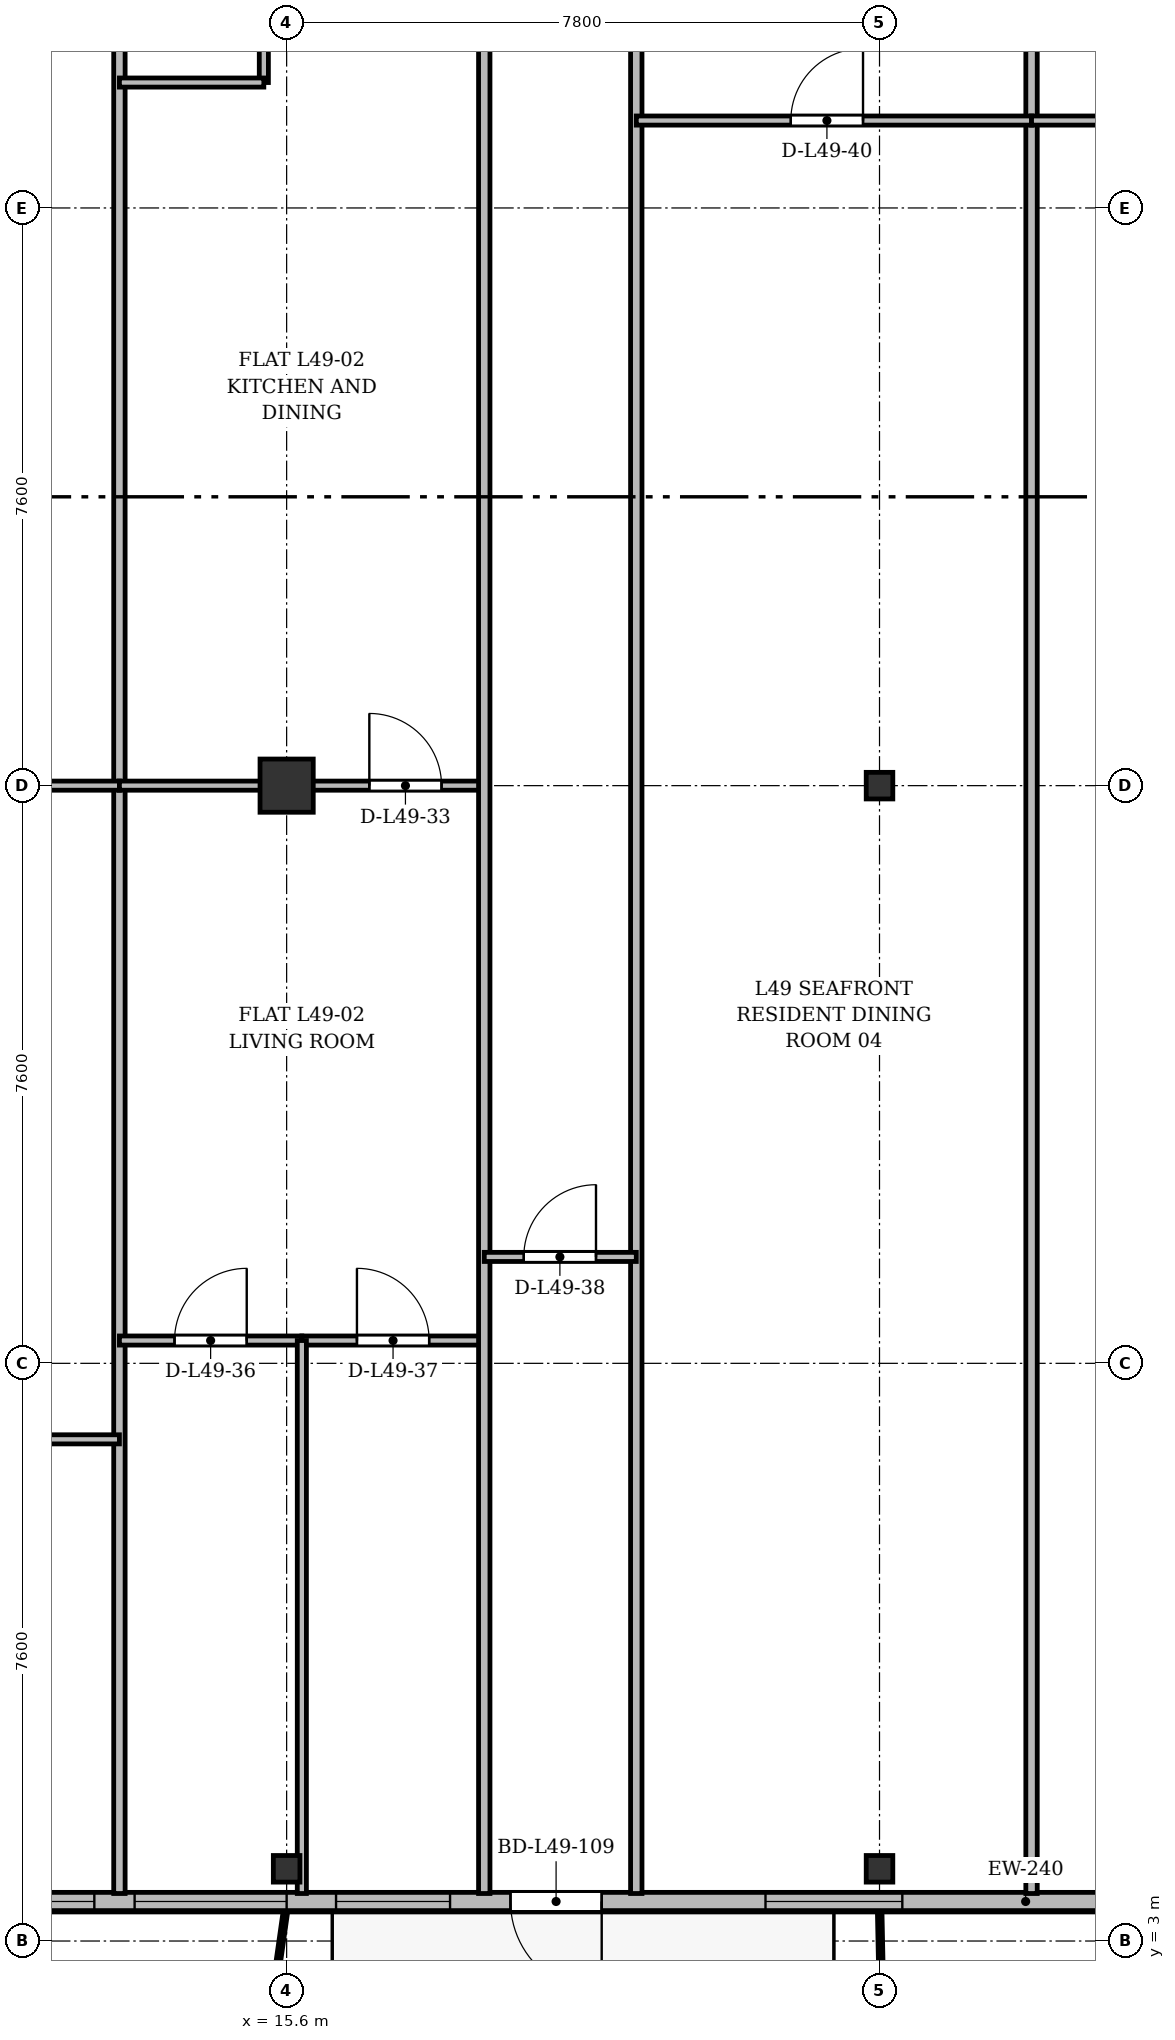
"""IFC4 building model, lengths in metres.
Left out: names, types, materials, properties, quantities, classifications, styles, units other than length and angle.
Written with IfcOpenShell. Run it as: python <this file> out.ifc"""

import sys

from ifc_helpers import new_model, si_unit, direction, frame, frame_2d, origin, origin_2d, place, context, subcontext, project, spatial, rectangle, i_section, extrude, source, transform, mapped, element, fill, save


model = new_model("IFC4")
c1 = context("Model", 3, precision=1e-05, world=origin(), true_north=direction((0.0, 1.0)))
c2 = subcontext(c1, "Body", "Model", "MODEL_VIEW")
j1 = project(units=[si_unit("LENGTHUNIT", "METRE"), si_unit("PLANEANGLEUNIT", "RADIAN")], contexts=[c1])
p1 = place(None, origin())
s1 = spatial("IfcSite", under=j1, at=p1, CompositionType="ELEMENT")
p2 = place(p1, origin())
s2 = spatial("IfcBuilding", under=s1, at=p2, CompositionType="ELEMENT")
p3 = place(p2, frame((0.0, 0.0, 190.5)))
s3 = spatial("IfcBuildingStorey", under=s2, at=p3, CompositionType="ELEMENT", Elevation=190.5)
m1 = source(origin(), c2, "Body", "SweptSolid", [
    extrude(i_section(OverallWidth=0.35, OverallDepth=0.35, WebThickness=0.018, FlangeThickness=0.028, at=origin_2d()), origin(), (0.0, 0.0, 1.0), 3.6),
])
p4 = place(p3, frame((15.6, 3.95, 0.0), z_axis=(0.0, 0.0, 1.0), x_axis=(1.0, 0.0, 0.0)))
e1 = element("IfcColumn", 1, at=p4, inside=s3, PredefinedType="COLUMN", context=c2, shape_type="MappedRepresentation", body=[
    mapped(m1, transform((0.0, 0.0, 0.0), x_axis=(1.0, 0.0, 0.0), y_axis=(0.0, 1.0, 0.0), z_axis=(0.0, 0.0, 1.0), scale=1.0)),
])
m2 = source(origin(), c2, "Body", "SweptSolid", [
    extrude(rectangle(XDim=0.7, YDim=0.7, at=origin_2d()), origin(), (0.0, 0.0, 1.0), 3.6),
])
p5 = place(p3, frame((15.6, 18.2, 0.0), z_axis=(0.0, 0.0, 1.0), x_axis=(1.0, 0.0, 0.0)))
e2 = element("IfcColumn", 2, at=p5, inside=s3, PredefinedType="COLUMN", context=c2, shape_type="MappedRepresentation", body=[
    mapped(m2, transform((0.0, 0.0, 0.0), x_axis=(1.0, 0.0, 0.0), y_axis=(0.0, 1.0, 0.0), z_axis=(0.0, 0.0, 1.0), scale=1.0)),
])
for number, where, z_axis, x_axis in (
    (3, (23.4, 3.95, 0.0), (0.0, 0.0, 1.0), (1.0, 0.0, 0.0)),
    (4, (23.4, 18.2, 0.0), (0.0, 0.0, 1.0), (1.0, 0.0, 0.0)),
):
    element("IfcColumn", number, at=place(p3, frame(where, z_axis=z_axis, x_axis=x_axis)), inside=s3, PredefinedType="COLUMN", context=c2, shape_type="MappedRepresentation", body=[
        mapped(m1, transform((0.0, 0.0, 0.0), x_axis=(1.0, 0.0, 0.0), y_axis=(0.0, 1.0, 0.0), z_axis=(0.0, 0.0, 1.0), scale=1.0)),
    ])
p6 = place(p3, frame((30.6, 3.52, 0.0), z_axis=(0.0, 0.0, 1.0), x_axis=(-1.0, 0.0, 0.0)))
e5 = element("IfcWall", 5, at=p6, inside=s3, PredefinedType="SOLIDWALL", context=c2, shape_type="SweptSolid", body=[
    extrude(rectangle(XDim=19.6, YDim=0.24, at=frame_2d((9.8, 0.0))), origin(), (0.0, 0.0, 1.0), 3.36),
])
p7 = place(p6, frame((1.82, 0.0, 0.9)))
e6 = element("IfcOpeningElement", 6, at=p7, cuts=e5, PredefinedType="OPENING", context=c2, shape_type="SweptSolid", body=[
    extrude(rectangle(XDim=1.65, YDim=1.85, at=frame_2d((0.825, 0.925))), frame((0.0, 0.13, 0.0), z_axis=(0.0, -1.0, 0.0), x_axis=(1.0, 0.0, 0.0)), (0.0, 0.0, 1.0), 0.26),
])
p8 = place(p6, frame((6.9, 0.0, 0.9)))
e7 = element("IfcOpeningElement", 7, at=p8, cuts=e5, PredefinedType="OPENING", context=c2, shape_type="SweptSolid", body=[
    extrude(rectangle(XDim=1.8, YDim=1.8, at=frame_2d((0.9, 0.9))), frame((0.0, 0.13, 0.0), z_axis=(0.0, -1.0, 0.0), x_axis=(1.0, 0.0, 0.0)), (0.0, 0.0, 1.0), 0.26),
])
p9 = place(p6, frame((10.855, 0.0, 0.0)))
e8 = element("IfcOpeningElement", 8, at=p9, cuts=e5, PredefinedType="OPENING", context=c2, shape_type="SweptSolid", body=[
    extrude(rectangle(XDim=1.2, YDim=2.2, at=frame_2d((0.6, 1.1))), frame((0.0, 0.13, 0.0), z_axis=(0.0, -1.0, 0.0), x_axis=(1.0, 0.0, 0.0)), (0.0, 0.0, 1.0), 0.26),
])
p10 = place(p6, frame((12.85, 0.0, 0.9)))
e9 = element("IfcOpeningElement", 9, at=p10, cuts=e5, PredefinedType="OPENING", context=c2, shape_type="SweptSolid", body=[
    extrude(rectangle(XDim=1.5, YDim=1.75, at=frame_2d((0.75, 0.875))), frame((0.0, 0.13, 0.0), z_axis=(0.0, -1.0, 0.0), x_axis=(1.0, 0.0, 0.0)), (0.0, 0.0, 1.0), 0.26),
])
p11 = place(p6, frame((15.0, 0.0, 0.9)))
e10 = element("IfcOpeningElement", 10, at=p11, cuts=e5, PredefinedType="OPENING", context=c2, shape_type="SweptSolid", body=[
    extrude(rectangle(XDim=2.0, YDim=1.95, at=frame_2d((1.0, 0.975))), frame((0.0, 0.13, 0.0), z_axis=(0.0, -1.0, 0.0), x_axis=(1.0, 0.0, 0.0)), (0.0, 0.0, 1.0), 0.26),
])
p12 = place(p6, frame((17.53, 0.0, 0.9)))
e11 = element("IfcOpeningElement", 11, at=p12, cuts=e5, PredefinedType="OPENING", context=c2, shape_type="SweptSolid", body=[
    extrude(rectangle(XDim=1.65, YDim=1.85, at=frame_2d((0.825, 0.925))), frame((0.0, 0.13, 0.0), z_axis=(0.0, -1.0, 0.0), x_axis=(1.0, 0.0, 0.0)), (0.0, 0.0, 1.0), 0.26),
])
for number, where, z_axis, x_axis in (
    (12, (13.4, 3.625, 0.0), (0.0, 0.0, 1.0), (0.0, 1.0, 0.0)),
    (13, (25.4, 3.625, 0.0), (0.0, 0.0, 1.0), (0.0, 1.0, 0.0)),
):
    element("IfcWall", number, at=place(p3, frame(where, z_axis=z_axis, x_axis=x_axis)), inside=s3, PredefinedType="PARTITIONING", context=c2, shape_type="SweptSolid", body=[
        extrude(rectangle(XDim=27.175, YDim=0.15, at=frame_2d((13.587, 0.0))), origin(), (0.0, 0.0, 1.0), 2.91),
    ])
p13 = place(p3, frame((8.24, 18.2, 0.0), z_axis=(0.0, 0.0, 1.0), x_axis=(1.0, 0.0, 0.0)))
e14 = element("IfcWall", 14, at=p13, inside=s3, PredefinedType="PARTITIONING", context=c2, shape_type="SweptSolid", body=[
    extrude(rectangle(XDim=5.16, YDim=0.12, at=frame_2d((2.58, 0.0))), origin(), (0.0, 0.0, 1.0), 2.91),
])
p14 = place(p13, frame((2.014, 0.0, 0.0)))
e15 = element("IfcOpeningElement", 15, at=p14, cuts=e14, PredefinedType="OPENING", context=c2, shape_type="SweptSolid", body=[
    extrude(rectangle(XDim=0.95, YDim=2.15, at=frame_2d((0.475, 1.075))), frame((0.0, 0.07, 0.0), z_axis=(0.0, -1.0, 0.0), x_axis=(1.0, 0.0, 0.0)), (0.0, 0.0, 1.0), 0.14),
])
p15 = place(p3, frame((8.24, 9.6, 0.0), z_axis=(0.0, 0.0, 1.0), x_axis=(1.0, 0.0, 0.0)))
e16 = element("IfcWall", 16, at=p15, inside=s3, PredefinedType="PARTITIONING", context=c2, shape_type="SweptSolid", body=[
    extrude(rectangle(XDim=5.16, YDim=0.12, at=frame_2d((2.58, 0.0))), origin(), (0.0, 0.0, 1.0), 2.86),
])
p16 = place(p15, frame((2.014, 0.0, 0.0)))
e17 = element("IfcOpeningElement", 17, at=p16, cuts=e16, PredefinedType="OPENING", context=c2, shape_type="SweptSolid", body=[
    extrude(rectangle(XDim=0.95, YDim=2.15, at=frame_2d((0.475, 1.075))), frame((0.0, 0.07, 0.0), z_axis=(0.0, -1.0, 0.0), x_axis=(1.0, 0.0, 0.0)), (0.0, 0.0, 1.0), 0.14),
])
p17 = place(p3, frame((13.4, 18.2, 0.0), z_axis=(0.0, 0.0, 1.0), x_axis=(1.0, 0.0, 0.0)))
e18 = element("IfcWall", 18, at=p17, inside=s3, PredefinedType="PARTITIONING", context=c2, shape_type="SweptSolid", body=[
    extrude(rectangle(XDim=4.8, YDim=0.12, at=frame_2d((2.4, 0.0))), origin(), (0.0, 0.0, 1.0), 2.91),
])
p18 = place(p17, frame((3.288, 0.0, 0.0)))
e19 = element("IfcOpeningElement", 19, at=p18, cuts=e18, PredefinedType="OPENING", context=c2, shape_type="SweptSolid", body=[
    extrude(rectangle(XDim=0.95, YDim=2.15, at=frame_2d((0.475, 1.075))), frame((0.0, 0.07, 0.0), z_axis=(0.0, -1.0, 0.0), x_axis=(1.0, 0.0, 0.0)), (0.0, 0.0, 1.0), 0.14),
])
p19 = place(p3, frame((15.3, 27.45, 0.0), z_axis=(0.0, 0.0, 1.0), x_axis=(0.0, 1.0, 0.0)))
e20 = element("IfcWall", 20, at=p19, inside=s3, PredefinedType="PARTITIONING", context=c2, shape_type="SweptSolid", body=[
    extrude(rectangle(XDim=3.35, YDim=0.12, at=frame_2d((1.675, 0.0))), origin(), (0.0, 0.0, 1.0), 3.36),
])
p20 = place(p19, frame((0.8, 0.0, 0.0)))
e21 = element("IfcOpeningElement", 21, at=p20, cuts=e20, PredefinedType="OPENING", context=c2, shape_type="SweptSolid", body=[
    extrude(rectangle(XDim=0.85, YDim=2.1, at=frame_2d((0.425, 1.05))), frame((0.0, 0.07, 0.0), z_axis=(0.0, -1.0, 0.0), x_axis=(1.0, 0.0, 0.0)), (0.0, 0.0, 1.0), 0.14),
])
p21 = place(p3, frame((13.4, 27.45, 0.0), z_axis=(0.0, 0.0, 1.0), x_axis=(1.0, 0.0, 0.0)))
e22 = element("IfcWall", 22, at=p21, inside=s3, PredefinedType="PARTITIONING", context=c2, shape_type="SweptSolid", body=[
    extrude(rectangle(XDim=1.9, YDim=0.12, at=frame_2d((0.95, 0.0))), origin(), (0.0, 0.0, 1.0), 3.36),
])
p22 = place(p3, frame((13.4, 10.9, 0.0), z_axis=(0.0, 0.0, 1.0), x_axis=(1.0, 0.0, 0.0)))
e23 = element("IfcWall", 23, at=p22, inside=s3, PredefinedType="PARTITIONING", context=c2, shape_type="SweptSolid", body=[
    extrude(rectangle(XDim=2.4, YDim=0.12, at=frame_2d((1.2, 0.0))), origin(), (0.0, 0.0, 1.0), 2.86),
])
p23 = place(p22, frame((0.725, 0.0, 0.0)))
e24 = element("IfcOpeningElement", 24, at=p23, cuts=e23, PredefinedType="OPENING", context=c2, shape_type="SweptSolid", body=[
    extrude(rectangle(XDim=0.95, YDim=2.15, at=frame_2d((0.475, 1.075))), frame((0.0, 0.07, 0.0), z_axis=(0.0, -1.0, 0.0), x_axis=(1.0, 0.0, 0.0)), (0.0, 0.0, 1.0), 0.14),
])
p24 = place(p3, frame((15.8, 10.9, 0.0), z_axis=(0.0, 0.0, 1.0), x_axis=(1.0, 0.0, 0.0)))
e25 = element("IfcWall", 25, at=p24, inside=s3, PredefinedType="PARTITIONING", context=c2, shape_type="SweptSolid", body=[
    extrude(rectangle(XDim=2.4, YDim=0.12, at=frame_2d((1.2, 0.0))), origin(), (0.0, 0.0, 1.0), 3.36),
])
p25 = place(p24, frame((0.725, 0.0, 0.0)))
e26 = element("IfcOpeningElement", 26, at=p25, cuts=e25, PredefinedType="OPENING", context=c2, shape_type="SweptSolid", body=[
    extrude(rectangle(XDim=0.95, YDim=2.15, at=frame_2d((0.475, 1.075))), frame((0.0, 0.07, 0.0), z_axis=(0.0, -1.0, 0.0), x_axis=(1.0, 0.0, 0.0)), (0.0, 0.0, 1.0), 0.14),
])
p26 = place(p3, frame((15.8, 3.625, 0.0), z_axis=(0.0, 0.0, 1.0), x_axis=(0.0, 1.0, 0.0)))
e27 = element("IfcWall", 27, at=p26, inside=s3, PredefinedType="PARTITIONING", context=c2, shape_type="SweptSolid", body=[
    extrude(rectangle(XDim=7.275, YDim=0.12, at=frame_2d((3.637, 0.0))), origin(), (0.0, 0.0, 1.0), 2.91),
])
for number, where, z_axis, x_axis in (
    (28, (18.2, 3.625, 0.0), (0.0, 0.0, 1.0), (0.0, 1.0, 0.0)),
    (29, (20.2, 3.625, 0.0), (0.0, 0.0, 1.0), (0.0, 1.0, 0.0)),
):
    element("IfcWall", number, at=place(p3, frame(where, z_axis=z_axis, x_axis=x_axis)), inside=s3, PredefinedType="PARTITIONING", context=c2, shape_type="SweptSolid", body=[
        extrude(rectangle(XDim=27.175, YDim=0.15, at=frame_2d((13.587, 0.0))), origin(), (0.0, 0.0, 1.0), 2.91),
    ])
p27 = place(p3, frame((18.2, 12.0, 0.0), z_axis=(0.0, 0.0, 1.0), x_axis=(1.0, 0.0, 0.0)))
e30 = element("IfcWall", 30, at=p27, inside=s3, PredefinedType="PARTITIONING", context=c2, shape_type="SweptSolid", body=[
    extrude(rectangle(XDim=2.0, YDim=0.12, at=frame_2d((1.0, 0.0))), origin(), (0.0, 0.0, 1.0), 3.36),
])
p28 = place(p27, frame((0.52, 0.0, 0.0)))
e31 = element("IfcOpeningElement", 31, at=p28, cuts=e30, PredefinedType="OPENING", context=c2, shape_type="SweptSolid", body=[
    extrude(rectangle(XDim=0.95, YDim=2.15, at=frame_2d((0.475, 1.075))), frame((0.0, 0.07, 0.0), z_axis=(0.0, -1.0, 0.0), x_axis=(1.0, 0.0, 0.0)), (0.0, 0.0, 1.0), 0.14),
])
p29 = place(p3, frame((20.2, 26.95, 0.0), z_axis=(0.0, 0.0, 1.0), x_axis=(1.0, 0.0, 0.0)))
e32 = element("IfcWall", 32, at=p29, inside=s3, PredefinedType="PARTITIONING", context=c2, shape_type="SweptSolid", body=[
    extrude(rectangle(XDim=5.2, YDim=0.12, at=frame_2d((2.6, 0.0))), origin(), (0.0, 0.0, 1.0), 2.86),
])
p30 = place(p29, frame((2.033, 0.0, 0.0)))
e33 = element("IfcOpeningElement", 33, at=p30, cuts=e32, PredefinedType="OPENING", context=c2, shape_type="SweptSolid", body=[
    extrude(rectangle(XDim=0.95, YDim=2.15, at=frame_2d((0.475, 1.075))), frame((0.0, 0.07, 0.0), z_axis=(0.0, -1.0, 0.0), x_axis=(1.0, 0.0, 0.0)), (0.0, 0.0, 1.0), 0.14),
])
p31 = place(p3, frame((25.4, 26.95, 0.0), z_axis=(0.0, 0.0, 1.0), x_axis=(1.0, 0.0, 0.0)))
e34 = element("IfcWall", 34, at=p31, inside=s3, PredefinedType="PARTITIONING", context=c2, shape_type="SweptSolid", body=[
    extrude(rectangle(XDim=4.975, YDim=0.12, at=frame_2d((2.488, 0.0))), origin(), (0.0, 0.0, 1.0), 3.36),
])
p32 = place(p31, frame((2.013, 0.0, 0.0)))
e35 = element("IfcOpeningElement", 35, at=p32, cuts=e34, PredefinedType="OPENING", context=c2, shape_type="SweptSolid", body=[
    extrude(rectangle(XDim=0.95, YDim=2.15, at=frame_2d((0.475, 1.075))), frame((0.0, 0.07, 0.0), z_axis=(0.0, -1.0, 0.0), x_axis=(1.0, 0.0, 0.0)), (0.0, 0.0, 1.0), 0.14),
])
m3 = source(origin(), c2, "Body", "SweptSolid", [
    extrude(rectangle(XDim=1.8, YDim=1.8, at=frame_2d((0.9, 0.9))), frame((0.0, 0.03, 0.0), z_axis=(0.0, -1.0, 0.0), x_axis=(1.0, 0.0, 0.0)), (0.0, 0.0, 1.0), 0.06),
])
p33 = place(p8, origin())
e36 = element("IfcWindow", 36, at=p33, inside=s3, PartitioningType="SINGLE_PANEL", PredefinedType="WINDOW", context=c2, shape_type="MappedRepresentation", body=[
    mapped(m3, transform((0.0, 0.0, 0.0), x_axis=(1.0, 0.0, 0.0), y_axis=(0.0, 1.0, 0.0), z_axis=(0.0, 0.0, 1.0), scale=1.0)),
])
fill(e7, e36)
m4 = source(origin(), c2, "Body", "SweptSolid", [
    extrude(rectangle(XDim=1.2, YDim=2.2, at=frame_2d((0.6, 1.1))), frame((0.0, 0.025, 0.0), z_axis=(0.0, -1.0, 0.0), x_axis=(1.0, 0.0, 0.0)), (0.0, 0.0, 1.0), 0.05),
])
p34 = place(p9, origin())
e37 = element("IfcDoor", 37, at=p34, inside=s3, OperationType="SINGLE_SWING_LEFT", PredefinedType="DOOR", context=c2, shape_type="MappedRepresentation", body=[
    mapped(m4, transform((0.0, 0.0, 0.0), x_axis=(1.0, 0.0, 0.0), y_axis=(0.0, 1.0, 0.0), z_axis=(0.0, 0.0, 1.0), scale=1.0)),
])
fill(e8, e37)
m5 = source(origin(), c2, "Body", "SweptSolid", [
    extrude(rectangle(XDim=1.5, YDim=1.75, at=frame_2d((0.75, 0.875))), frame((0.0, 0.03, 0.0), z_axis=(0.0, -1.0, 0.0), x_axis=(1.0, 0.0, 0.0)), (0.0, 0.0, 1.0), 0.06),
])
p35 = place(p10, origin())
e38 = element("IfcWindow", 38, at=p35, inside=s3, PartitioningType="SINGLE_PANEL", PredefinedType="WINDOW", context=c2, shape_type="MappedRepresentation", body=[
    mapped(m5, transform((0.0, 0.0, 0.0), x_axis=(1.0, 0.0, 0.0), y_axis=(0.0, 1.0, 0.0), z_axis=(0.0, 0.0, 1.0), scale=1.0)),
])
fill(e9, e38)
m6 = source(origin(), c2, "Body", "SweptSolid", [
    extrude(rectangle(XDim=2.0, YDim=1.95, at=frame_2d((1.0, 0.975))), frame((0.0, 0.03, 0.0), z_axis=(0.0, -1.0, 0.0), x_axis=(1.0, 0.0, 0.0)), (0.0, 0.0, 1.0), 0.06),
])
p36 = place(p11, origin())
e39 = element("IfcWindow", 39, at=p36, inside=s3, PartitioningType="SINGLE_PANEL", PredefinedType="WINDOW", context=c2, shape_type="MappedRepresentation", body=[
    mapped(m6, transform((0.0, 0.0, 0.0), x_axis=(1.0, 0.0, 0.0), y_axis=(0.0, 1.0, 0.0), z_axis=(0.0, 0.0, 1.0), scale=1.0)),
])
fill(e10, e39)
m7 = source(origin(), c2, "Body", "SweptSolid", [
    extrude(rectangle(XDim=1.65, YDim=1.85, at=frame_2d((0.825, 0.925))), frame((0.0, 0.03, 0.0), z_axis=(0.0, -1.0, 0.0), x_axis=(1.0, 0.0, 0.0)), (0.0, 0.0, 1.0), 0.06),
])
p37 = place(p12, origin())
e40 = element("IfcWindow", 40, at=p37, inside=s3, PartitioningType="SINGLE_PANEL", PredefinedType="WINDOW", context=c2, shape_type="MappedRepresentation", body=[
    mapped(m7, transform((0.0, 0.0, 0.0), x_axis=(1.0, 0.0, 0.0), y_axis=(0.0, 1.0, 0.0), z_axis=(0.0, 0.0, 1.0), scale=1.0)),
])
fill(e11, e40)
m8 = source(origin(), c2, "Body", "SweptSolid", [
    extrude(rectangle(XDim=0.95, YDim=2.15, at=frame_2d((0.475, 1.075))), frame((0.0, 0.025, 0.0), z_axis=(0.0, -1.0, 0.0), x_axis=(1.0, 0.0, 0.0)), (0.0, 0.0, 1.0), 0.05),
])
p38 = place(p18, origin())
e41 = element("IfcDoor", 41, at=p38, inside=s3, OperationType="SINGLE_SWING_LEFT", PredefinedType="DOOR", context=c2, shape_type="MappedRepresentation", body=[
    mapped(m8, transform((0.0, 0.0, 0.0), x_axis=(1.0, 0.0, 0.0), y_axis=(0.0, 1.0, 0.0), z_axis=(0.0, 0.0, 1.0), scale=1.0)),
])
fill(e19, e41)
p39 = place(p23, origin())
e42 = element("IfcDoor", 42, at=p39, inside=s3, OperationType="SINGLE_SWING_RIGHT", PredefinedType="DOOR", context=c2, shape_type="MappedRepresentation", body=[
    mapped(m8, transform((0.0, 0.0, 0.0), x_axis=(1.0, 0.0, 0.0), y_axis=(0.0, 1.0, 0.0), z_axis=(0.0, 0.0, 1.0), scale=1.0)),
])
fill(e24, e42)
p40 = place(p25, origin())
e43 = element("IfcDoor", 43, at=p40, inside=s3, OperationType="SINGLE_SWING_LEFT", PredefinedType="DOOR", context=c2, shape_type="MappedRepresentation", body=[
    mapped(m8, transform((0.0, 0.0, 0.0), x_axis=(1.0, 0.0, 0.0), y_axis=(0.0, 1.0, 0.0), z_axis=(0.0, 0.0, 1.0), scale=1.0)),
])
fill(e26, e43)
p41 = place(p28, origin())
e44 = element("IfcDoor", 44, at=p41, inside=s3, OperationType="SINGLE_SWING_RIGHT", PredefinedType="DOOR", context=c2, shape_type="MappedRepresentation", body=[
    mapped(m8, transform((0.0, 0.0, 0.0), x_axis=(1.0, 0.0, 0.0), y_axis=(0.0, 1.0, 0.0), z_axis=(0.0, 0.0, 1.0), scale=1.0)),
])
fill(e31, e44)
p42 = place(p30, origin())
e45 = element("IfcDoor", 45, at=p42, inside=s3, OperationType="SINGLE_SWING_RIGHT", PredefinedType="DOOR", context=c2, shape_type="MappedRepresentation", body=[
    mapped(m8, transform((0.0, 0.0, 0.0), x_axis=(1.0, 0.0, 0.0), y_axis=(0.0, 1.0, 0.0), z_axis=(0.0, 0.0, 1.0), scale=1.0)),
])
fill(e33, e45)
save(model, sys.argv[1])
